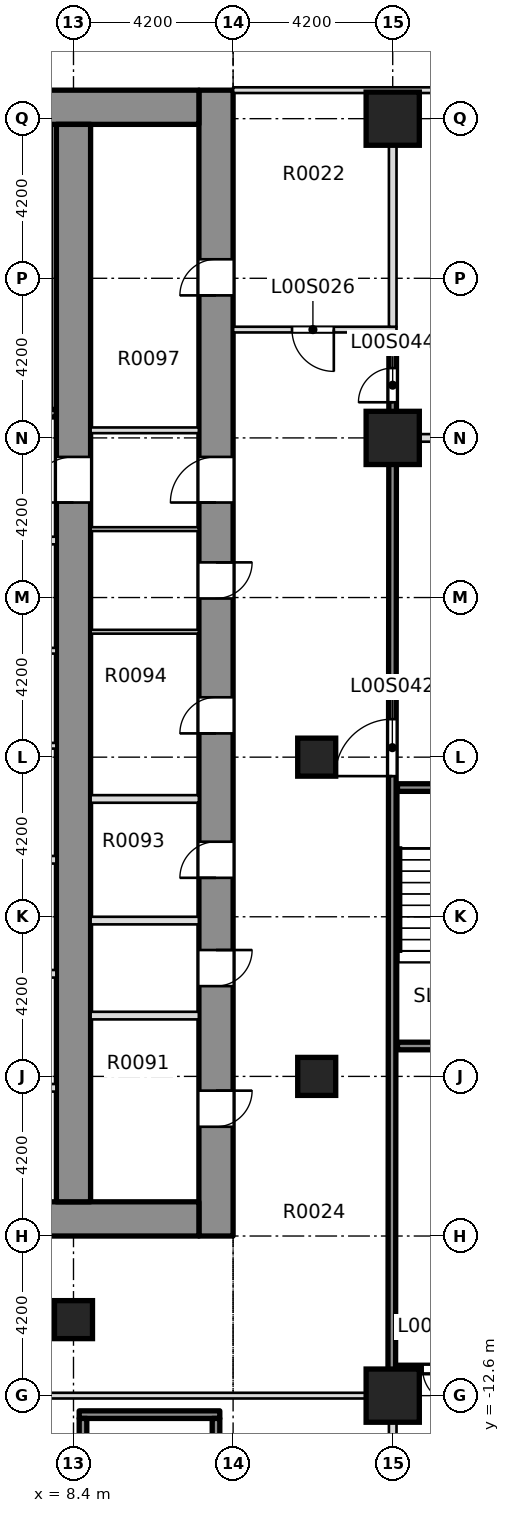
"""IFC4 building model, lengths in metres.
Left out: names, types, materials, properties, quantities, classifications, styles, units other than length and angle.
Written with IfcOpenShell. Run it as: python <this file> out.ifc"""

import sys

from ifc_helpers import new_model, si_unit, direction, frame, frame_2d, origin, origin_2d, place, context, subcontext, project, spatial, rectangle, extrude, element, fill, save


model = new_model("IFC4")
c1 = context("Model", 3, precision=1e-05, world=origin(), true_north=direction((0.0, 1.0)))
c2 = subcontext(c1, "Body", "Model", "MODEL_VIEW")
j1 = project(units=[si_unit("LENGTHUNIT", "METRE"), si_unit("PLANEANGLEUNIT", "RADIAN")], contexts=[c1])
p1 = place(None, origin())
s1 = spatial("IfcSite", under=j1, at=p1, CompositionType="ELEMENT")
p2 = place(p1, origin())
s2 = spatial("IfcBuilding", under=s1, at=p2, CompositionType="ELEMENT")
p3 = place(p2, origin())
s3 = spatial("IfcBuildingStorey", under=s2, at=p3, CompositionType="ELEMENT", Elevation=0.0)
p4 = place(p3, frame((12.15, -8.4, -0.45), z_axis=(0.0, 0.0, 1.0), x_axis=(0.0, 1.0, 0.0)))
e1 = element("IfcWall", 1, at=p4, inside=s3, PredefinedType="SHEAR", context=c2, shape_type="SweptSolid", body=[
    extrude(rectangle(XDim=30.15, YDim=0.9, at=frame_2d((15.075, 0.0))), origin(), (0.0, 0.0, 1.0), 7.55),
])
p5 = place(p4, frame((2.875, 0.0, 0.45)))
e2 = element("IfcOpeningElement", 2, at=p5, cuts=e1, PredefinedType="OPENING", context=c2, shape_type="SweptSolid", body=[
    extrude(rectangle(XDim=0.95, YDim=2.1, at=frame_2d((0.475, 1.05))), frame((0.0, 0.46, 0.0), z_axis=(0.0, -1.0, 0.0), x_axis=(1.0, 0.0, 0.0)), (0.0, 0.0, 1.0), 0.92),
])
p6 = place(p4, frame((6.575, 0.0, 0.45)))
e3 = element("IfcOpeningElement", 3, at=p6, cuts=e1, PredefinedType="OPENING", context=c2, shape_type="SweptSolid", body=[
    extrude(rectangle(XDim=0.95, YDim=2.1, at=frame_2d((0.475, 1.05))), frame((0.0, 0.46, 0.0), z_axis=(0.0, -1.0, 0.0), x_axis=(1.0, 0.0, 0.0)), (0.0, 0.0, 1.0), 0.92),
])
p7 = place(p4, frame((9.425, 0.0, 0.45)))
e4 = element("IfcOpeningElement", 4, at=p7, cuts=e1, PredefinedType="OPENING", context=c2, shape_type="SweptSolid", body=[
    extrude(rectangle(XDim=0.95, YDim=2.1, at=frame_2d((0.475, 1.05))), frame((0.0, 0.46, 0.0), z_axis=(0.0, -1.0, 0.0), x_axis=(1.0, 0.0, 0.0)), (0.0, 0.0, 1.0), 0.92),
])
p8 = place(p4, frame((13.225, 0.0, 0.45)))
e5 = element("IfcOpeningElement", 5, at=p8, cuts=e1, PredefinedType="OPENING", context=c2, shape_type="SweptSolid", body=[
    extrude(rectangle(XDim=0.95, YDim=2.1, at=frame_2d((0.475, 1.05))), frame((0.0, 0.46, 0.0), z_axis=(0.0, -1.0, 0.0), x_axis=(1.0, 0.0, 0.0)), (0.0, 0.0, 1.0), 0.92),
])
p9 = place(p4, frame((16.775, 0.0, 0.45)))
e6 = element("IfcOpeningElement", 6, at=p9, cuts=e1, PredefinedType="OPENING", context=c2, shape_type="SweptSolid", body=[
    extrude(rectangle(XDim=0.95, YDim=2.1, at=frame_2d((0.475, 1.05))), frame((0.0, 0.46, 0.0), z_axis=(0.0, -1.0, 0.0), x_axis=(1.0, 0.0, 0.0)), (0.0, 0.0, 1.0), 0.92),
])
p10 = place(p4, frame((24.75, 0.0, 0.45)))
e7 = element("IfcOpeningElement", 7, at=p10, cuts=e1, PredefinedType="OPENING", context=c2, shape_type="SweptSolid", body=[
    extrude(rectangle(XDim=0.95, YDim=2.1, at=frame_2d((0.475, 1.05))), frame((0.0, 0.46, 0.0), z_axis=(0.0, -1.0, 0.0), x_axis=(1.0, 0.0, 0.0)), (0.0, 0.0, 1.0), 0.92),
])
p11 = place(p4, frame((19.3, 0.0, 0.45)))
e8 = element("IfcOpeningElement", 8, at=p11, cuts=e1, PredefinedType="OPENING", context=c2, shape_type="SweptSolid", body=[
    extrude(rectangle(XDim=1.2, YDim=2.1, at=frame_2d((0.6, 1.05))), frame((0.0, 0.46, 0.0), z_axis=(0.0, -1.0, 0.0), x_axis=(1.0, 0.0, 0.0)), (0.0, 0.0, 1.0), 0.92),
])
p12 = place(p3, frame((-11.7, -7.95, -0.45), z_axis=(0.0, 0.0, 1.0), x_axis=(1.0, 0.0, 0.0)))
e9 = element("IfcWall", 9, at=p12, inside=s3, PredefinedType="SHEAR", context=c2, shape_type="SweptSolid", body=[
    extrude(rectangle(XDim=23.4, YDim=0.9, at=frame_2d((11.7, 0.0))), origin(), (0.0, 0.0, 1.0), 7.55),
])
p13 = place(p12, frame((6.95, 0.0, 0.45)))
e10 = element("IfcOpeningElement", 10, at=p13, cuts=e9, PredefinedType="OPENING", context=c2, shape_type="SweptSolid", body=[
    extrude(rectangle(XDim=1.8, YDim=2.1, at=frame_2d((0.9, 1.05))), frame((0.0, 0.46, 0.0), z_axis=(0.0, -1.0, 0.0), x_axis=(1.0, 0.0, 0.0)), (0.0, 0.0, 1.0), 0.92),
])
p14 = place(p12, frame((14.65, 0.0, 0.45)))
e11 = element("IfcOpeningElement", 11, at=p14, cuts=e9, PredefinedType="OPENING", context=c2, shape_type="SweptSolid", body=[
    extrude(rectangle(XDim=1.8, YDim=2.1, at=frame_2d((0.9, 1.05))), frame((0.0, 0.46, 0.0), z_axis=(0.0, -1.0, 0.0), x_axis=(1.0, 0.0, 0.0)), (0.0, 0.0, 1.0), 0.92),
])
p15 = place(p3, frame((-11.7, 21.3, -0.45), z_axis=(0.0, 0.0, 1.0), x_axis=(1.0, 0.0, 0.0)))
e12 = element("IfcWall", 12, at=p15, inside=s3, PredefinedType="SOLIDWALL", context=c2, shape_type="SweptSolid", body=[
    extrude(rectangle(XDim=23.4, YDim=0.9, at=frame_2d((11.7, 0.0))), origin(), (0.0, 0.0, 1.0), 7.55),
])
p16 = place(p15, frame((11.1, 0.0, 0.45)))
e13 = element("IfcOpeningElement", 13, at=p16, cuts=e12, PredefinedType="OPENING", context=c2, shape_type="SweptSolid", body=[
    extrude(rectangle(XDim=1.2, YDim=2.1, at=frame_2d((0.6, 1.05))), frame((0.0, 0.46, 0.0), z_axis=(0.0, -1.0, 0.0), x_axis=(1.0, 0.0, 0.0)), (0.0, 0.0, 1.0), 0.92),
])
p17 = place(p3, frame((8.4, -7.5, -0.45), z_axis=(0.0, 0.0, 1.0), x_axis=(0.0, 1.0, 0.0)))
e14 = element("IfcWall", 14, at=p17, inside=s3, PredefinedType="SHEAR", context=c2, shape_type="SweptSolid", body=[
    extrude(rectangle(XDim=28.35, YDim=0.9, at=frame_2d((14.175, 0.0))), origin(), (0.0, 0.0, 1.0), 7.55),
])
p18 = place(p17, frame((18.4, 0.0, 0.45)))
e15 = element("IfcOpeningElement", 15, at=p18, cuts=e14, PredefinedType="OPENING", context=c2, shape_type="SweptSolid", body=[
    extrude(rectangle(XDim=1.2, YDim=2.1, at=frame_2d((0.6, 1.05))), frame((0.0, 0.46, 0.0), z_axis=(0.0, -1.0, 0.0), x_axis=(1.0, 0.0, 0.0)), (0.0, 0.0, 1.0), 0.92),
])
for number, where, z_axis, x_axis in (
    (16, (16.8, -12.6, -0.45), (0.0, 0.0, 1.0), (1.0, 0.0, 0.0)),
    (17, (16.8, 12.6, -0.45), (0.0, 0.0, 1.0), (1.0, 0.0, 0.0)),
    (18, (16.8, 21.0, -0.45), (0.0, 0.0, 1.0), (1.0, 0.0, 0.0)),
):
    element("IfcColumn", number, at=place(p3, frame(where, z_axis=z_axis, x_axis=x_axis)), inside=s3, PredefinedType="COLUMN", context=c2, shape_type="SweptSolid", body=[
        extrude(rectangle(XDim=1.4, YDim=1.4, at=origin_2d()), origin(), (0.0, 0.0, 1.0), 7.55),
    ])
for number, where, z_axis, x_axis in (
    (19, (8.4, -10.6, -0.45), (0.0, 0.0, 1.0), (1.0, 0.0, 0.0)),
    (20, (14.8, -4.2, -0.45), (0.0, 0.0, 1.0), (1.0, 0.0, 0.0)),
    (21, (14.8, 4.2, -0.45), (0.0, 0.0, 1.0), (1.0, 0.0, 0.0)),
):
    element("IfcColumn", number, at=place(p3, frame(where, z_axis=z_axis, x_axis=x_axis)), inside=s3, PredefinedType="COLUMN", context=c2, shape_type="SweptSolid", body=[
        extrude(rectangle(XDim=1.0, YDim=1.0, at=origin_2d()), origin(), (0.0, 0.0, 1.0), 7.55),
    ])
p19 = place(p3, frame((7.275, -12.6, 0.0), z_axis=(0.0, 0.0, 1.0), x_axis=(1.0, 0.0, 0.0)))
e22 = element("IfcWall", 22, at=p19, inside=s3, PredefinedType="PARTITIONING", context=c2, shape_type="SweptSolid", body=[
    extrude(rectangle(XDim=9.625, YDim=0.15, at=frame_2d((4.812, 0.0))), origin(), (0.0, 0.0, 1.0), 7.1),
])
p20 = place(p3, frame((16.875, -11.9, 0.0), z_axis=(0.0, 0.0, 1.0), x_axis=(1.0, 0.0, 0.0)))
e23 = element("IfcWall", 23, at=p20, inside=s3, PredefinedType="SOLIDWALL", context=c2, shape_type="SweptSolid", body=[
    extrude(rectangle(XDim=8.425, YDim=0.2, at=frame_2d((4.212, 0.0))), origin(), (0.0, 0.0, 1.0), 7.1),
])
p21 = place(p20, frame((0.712, 0.0, 0.0)))
e24 = element("IfcOpeningElement", 24, at=p21, cuts=e23, PredefinedType="OPENING", context=c2, shape_type="SweptSolid", body=[
    extrude(rectangle(XDim=0.9, YDim=2.1, at=frame_2d((0.45, 1.05))), frame((0.0, 0.11, 0.0), z_axis=(0.0, -1.0, 0.0), x_axis=(1.0, 0.0, 0.0)), (0.0, 0.0, 1.0), 0.22),
])
p22 = place(p3, frame((16.875, 12.6, 0.0), z_axis=(0.0, 0.0, 1.0), x_axis=(1.0, 0.0, 0.0)))
e25 = element("IfcWall", 25, at=p22, inside=s3, PredefinedType="PARTITIONING", context=c2, shape_type="SweptSolid", body=[
    extrude(rectangle(XDim=34.075, YDim=0.2, at=frame_2d((17.038, 0.0))), origin(), (0.0, 0.0, 1.0), 7.1),
])
p23 = place(p22, frame((17.525, 0.0, 0.0)))
e26 = element("IfcOpeningElement", 26, at=p23, cuts=e25, PredefinedType="OPENING", context=c2, shape_type="SweptSolid", body=[
    extrude(rectangle(XDim=0.9, YDim=2.1, at=frame_2d((0.45, 1.05))), frame((0.0, 0.11, 0.0), z_axis=(0.0, -1.0, 0.0), x_axis=(1.0, 0.0, 0.0)), (0.0, 0.0, 1.0), 0.22),
])
p24 = place(p3, frame((12.601, 15.45, 0.0), z_axis=(0.0, 0.0, 1.0), x_axis=(1.0, 0.0, 0.0)))
e27 = element("IfcWall", 27, at=p24, inside=s3, PredefinedType="PARTITIONING", context=c2, shape_type="SweptSolid", body=[
    extrude(rectangle(XDim=4.299, YDim=0.15, at=frame_2d((2.149, 0.0))), origin(), (0.0, 0.0, 1.0), 7.1),
])
p25 = place(p24, frame((1.549, 0.0, 0.0)))
e28 = element("IfcOpeningElement", 28, at=p25, cuts=e27, PredefinedType="OPENING", context=c2, shape_type="SweptSolid", body=[
    extrude(rectangle(XDim=1.1, YDim=2.1, at=frame_2d((0.55, 1.05))), frame((0.0, 0.085, 0.0), z_axis=(0.0, -1.0, 0.0), x_axis=(1.0, 0.0, 0.0)), (0.0, 0.0, 1.0), 0.17),
])
p26 = place(p3, frame((12.601, 21.75, 0.0), z_axis=(0.0, 0.0, 1.0), x_axis=(1.0, 0.0, 0.0)))
e29 = element("IfcWall", 29, at=p26, inside=s3, PredefinedType="PARTITIONING", context=c2, shape_type="SweptSolid", body=[
    extrude(rectangle(XDim=21.074, YDim=0.15, at=frame_2d((10.537, 0.0))), origin(), (0.0, 0.0, 1.0), 7.1),
])
p27 = place(p3, frame((16.8, -18.125, 0.0), z_axis=(0.0, 0.0, 1.0), x_axis=(0.0, 1.0, 0.0)))
e30 = element("IfcWall", 30, at=p27, inside=s3, PredefinedType="PARTITIONING", context=c2, shape_type="SweptSolid", body=[
    extrude(rectangle(XDim=5.45, YDim=0.2, at=frame_2d((2.725, 0.0))), origin(), (0.0, 0.0, 1.0), 7.1),
])
p28 = place(p3, frame((16.775, -12.525, 0.0), z_axis=(0.0, 0.0, 1.0), x_axis=(0.000893357267, 0.999999600956, 0.0)))
e31 = element("IfcWall", 31, at=p28, inside=s3, PredefinedType="SOLIDWALL", context=c2, shape_type="SweptSolid", body=[
    extrude(rectangle(XDim=27.875, YDim=0.2, at=frame_2d((13.938, 0.0))), origin(), (0.0, 0.0, 1.0), 7.1),
])
p29 = place(p28, frame((16.225, 0.0, 0.0)))
e32 = element("IfcOpeningElement", 32, at=p29, cuts=e31, PredefinedType="OPENING", context=c2, shape_type="SweptSolid", body=[
    extrude(rectangle(XDim=1.5, YDim=2.1, at=frame_2d((0.75, 1.05))), frame((0.0, 0.11, 0.0), z_axis=(0.0, -1.0, 0.0), x_axis=(1.0, 0.0, 0.0)), (0.0, 0.0, 1.0), 0.22),
])
p30 = place(p28, frame((26.062, 0.0, 0.0)))
e33 = element("IfcOpeningElement", 33, at=p30, cuts=e31, PredefinedType="OPENING", context=c2, shape_type="SweptSolid", body=[
    extrude(rectangle(XDim=0.9, YDim=2.1, at=frame_2d((0.45, 1.05))), frame((0.0, 0.11, 0.0), z_axis=(0.0, -1.0, 0.0), x_axis=(1.0, 0.0, 0.0)), (0.0, 0.0, 1.0), 0.22),
])
p31 = place(p3, frame((16.8, 15.525, 0.0), z_axis=(0.0, 0.0, 1.0), x_axis=(0.0, 1.0, 0.0)))
e34 = element("IfcWall", 34, at=p31, inside=s3, PredefinedType="PARTITIONING", context=c2, shape_type="SweptSolid", body=[
    extrude(rectangle(XDim=6.15, YDim=0.2, at=frame_2d((3.075, 0.0))), origin(), (0.0, 0.0, 1.0), 7.1),
])
for number, where, z_axis, x_axis in (
    (35, (5.575, -4.5, 0.0), (0.0, 0.0, 1.0), (1.0, 0.0, 0.0)),
    (36, (5.575, -1.5, 0.0), (0.0, 0.0, 1.0), (1.0, 0.0, 0.0)),
    (37, (5.575, 1.5, 0.0), (0.0, 0.0, 1.0), (1.0, 0.0, 0.0)),
):
    element("IfcWall", number, at=place(p3, frame(where, z_axis=z_axis, x_axis=x_axis)), inside=s3, PredefinedType="PARTITIONING", context=c2, shape_type="SweptSolid", body=[
        extrude(rectangle(XDim=2.374, YDim=0.2, at=frame_2d((1.187, 0.0))), origin(), (0.0, 0.0, 1.0), 7.1),
    ])
p32 = place(p3, frame((5.425, 4.5, 0.0), z_axis=(0.0, 0.0, 1.0), x_axis=(1.0, 0.0, 0.0)))
e38 = element("IfcWall", 38, at=p32, inside=s3, PredefinedType="PARTITIONING", context=c2, shape_type="SweptSolid", body=[
    extrude(rectangle(XDim=2.524, YDim=0.15, at=frame_2d((1.262, 0.0))), origin(), (0.0, 0.0, 1.0), 7.1),
])
p33 = place(p3, frame((-7.949, 7.0, 0.0), z_axis=(0.0, 0.0, 1.0), x_axis=(1.0, 0.0, 0.0)))
e39 = element("IfcWall", 39, at=p33, inside=s3, PredefinedType="PARTITIONING", context=c2, shape_type="SweptSolid", body=[
    extrude(rectangle(XDim=15.898, YDim=0.15, at=frame_2d((7.949, 0.0))), origin(), (0.0, 0.0, 1.0), 7.1),
])
p34 = place(p33, frame((7.249, 0.0, 0.0)))
e40 = element("IfcOpeningElement", 40, at=p34, cuts=e39, PredefinedType="OPENING", context=c2, shape_type="SweptSolid", body=[
    extrude(rectangle(XDim=1.4, YDim=2.1, at=frame_2d((0.7, 1.05))), frame((0.0, 0.085, 0.0), z_axis=(0.0, -1.0, 0.0), x_axis=(1.0, 0.0, 0.0)), (0.0, 0.0, 1.0), 0.17),
])
p35 = place(p3, frame((3.6, 9.9, 0.0), z_axis=(0.0, 0.0, 1.0), x_axis=(1.0, 0.0, 0.0)))
e41 = element("IfcWall", 41, at=p35, inside=s3, PredefinedType="PARTITIONING", context=c2, shape_type="SweptSolid", body=[
    extrude(rectangle(XDim=4.349, YDim=0.2, at=frame_2d((2.174, 0.0))), origin(), (0.0, 0.0, 1.0), 7.1),
])
p36 = place(p35, frame((2.25, 0.0, 0.0)))
e42 = element("IfcOpeningElement", 42, at=p36, cuts=e41, PredefinedType="OPENING", context=c2, shape_type="SweptSolid", body=[
    extrude(rectangle(XDim=1.1, YDim=2.1, at=frame_2d((0.55, 1.05))), frame((0.0, 0.11, 0.0), z_axis=(0.0, -1.0, 0.0), x_axis=(1.0, 0.0, 0.0)), (0.0, 0.0, 1.0), 0.22),
])
p37 = place(p3, frame((3.425, 13.25, 0.0), z_axis=(0.0, 0.0, 1.0), x_axis=(1.0, 0.0, 0.0)))
e43 = element("IfcWall", 43, at=p37, inside=s3, PredefinedType="SOLIDWALL", context=c2, shape_type="SweptSolid", body=[
    extrude(rectangle(XDim=4.524, YDim=0.2, at=frame_2d((2.262, 0.0))), origin(), (0.0, 0.0, 1.0), 7.1),
])
p38 = place(p37, frame((1.825, 0.0, 0.0)))
e44 = element("IfcOpeningElement", 44, at=p38, cuts=e43, PredefinedType="OPENING", context=c2, shape_type="SweptSolid", body=[
    extrude(rectangle(XDim=1.2, YDim=2.1, at=frame_2d((0.6, 1.05))), frame((0.0, 0.11, 0.0), z_axis=(0.0, -1.0, 0.0), x_axis=(1.0, 0.0, 0.0)), (0.0, 0.0, 1.0), 0.22),
])
for number, where, z_axis, x_axis in (
    (45, (8.851, -2.6, 0.0), (0.0, 0.0, 1.0), (1.0, 0.0, 0.0)),
    (46, (8.851, -0.1, 0.0), (0.0, 0.0, 1.0), (1.0, 0.0, 0.0)),
    (47, (8.851, 3.1, 0.0), (0.0, 0.0, 1.0), (1.0, 0.0, 0.0)),
):
    element("IfcWall", number, at=place(p3, frame(where, z_axis=z_axis, x_axis=x_axis)), inside=s3, PredefinedType="PARTITIONING", context=c2, shape_type="SweptSolid", body=[
        extrude(rectangle(XDim=2.848, YDim=0.2, at=frame_2d((1.424, 0.0))), origin(), (0.0, 0.0, 1.0), 7.1),
    ])
for number, where, z_axis, x_axis in (
    (48, (8.851, 7.5, 0.0), (0.0, 0.0, 1.0), (1.0, 0.0, 0.0)),
    (49, (8.851, 10.2, 0.0), (0.0, 0.0, 1.0), (1.0, 0.0, 0.0)),
):
    element("IfcWall", number, at=place(p3, frame(where, z_axis=z_axis, x_axis=x_axis)), inside=s3, PredefinedType="PARTITIONING", context=c2, shape_type="SweptSolid", body=[
        extrude(rectangle(XDim=2.848, YDim=0.1, at=frame_2d((1.424, 0.0))), origin(), (0.0, 0.0, 1.0), 7.1),
    ])
p39 = place(p3, frame((8.851, 12.8, 0.0), z_axis=(0.0, 0.0, 1.0), x_axis=(1.0, 0.0, 0.0)))
e50 = element("IfcWall", 50, at=p39, inside=s3, PredefinedType="PARTITIONING", context=c2, shape_type="SweptSolid", body=[
    extrude(rectangle(XDim=2.848, YDim=0.15, at=frame_2d((1.424, 0.0))), origin(), (0.0, 0.0, 1.0), 7.1),
])
p40 = place(p3, frame((8.55, -13.1, 0.0), z_axis=(0.0, 0.0, 1.0), x_axis=(1.0, 0.0, 0.0)))
e51 = element("IfcWall", 51, at=p40, inside=s3, PredefinedType="SOLIDWALL", context=c2, shape_type="SweptSolid", body=[
    extrude(rectangle(XDim=3.7, YDim=0.2, at=frame_2d((1.85, 0.0))), origin(), (0.0, 0.0, 1.0), 7.1),
])
p41 = place(p3, frame((8.65, -20.3, 0.0), z_axis=(0.0, 0.0, 1.0), x_axis=(0.0, 1.0, 0.0)))
e52 = element("IfcWall", 52, at=p41, inside=s3, PredefinedType="SOLIDWALL", context=c2, shape_type="SweptSolid", body=[
    extrude(rectangle(XDim=7.1, YDim=0.2, at=frame_2d((3.55, 0.0))), origin(), (0.0, 0.0, 1.0), 7.1),
])
p42 = place(p3, frame((12.15, -19.8, 0.0), z_axis=(0.0, 0.0, 1.0), x_axis=(0.0, 1.0, 0.0)))
e53 = element("IfcWall", 53, at=p42, inside=s3, PredefinedType="SOLIDWALL", context=c2, shape_type="SweptSolid", body=[
    extrude(rectangle(XDim=6.6, YDim=0.2, at=frame_2d((3.3, 0.0))), origin(), (0.0, 0.0, 1.0), 7.1),
])
for number, where, z_axis, x_axis in (
    (54, (16.925, -3.4, 0.0), (0.0, 0.0, 1.0), (1.0, 0.0, 0.0)),
    (55, (16.925, 3.4, 0.0), (0.0, 0.0, 1.0), (1.0, 0.0, 0.0)),
):
    element("IfcWall", number, at=place(p3, frame(where, z_axis=z_axis, x_axis=x_axis)), inside=s3, PredefinedType="SOLIDWALL", context=c2, shape_type="SweptSolid", body=[
        extrude(rectangle(XDim=3.525, YDim=0.2, at=frame_2d((1.762, 0.0))), origin(), (0.0, 0.0, 1.0), 7.1),
    ])
p43 = place(p25, origin())
e56 = element("IfcDoor", 56, at=p43, inside=s3, OperationType="SINGLE_SWING_LEFT", PredefinedType="DOOR", context=c2, shape_type="SweptSolid", body=[
    extrude(rectangle(XDim=1.1, YDim=2.1, at=frame_2d((0.55, 1.05))), frame((0.0, 0.025, 0.0), z_axis=(0.0, -1.0, 0.0), x_axis=(1.0, 0.0, 0.0)), (0.0, 0.0, 1.0), 0.05),
])
fill(e28, e56)
p44 = place(p29, origin())
e57 = element("IfcDoor", 57, at=p44, inside=s3, OperationType="DOUBLE_DOOR_SINGLE_SWING", PredefinedType="DOOR", context=c2, shape_type="SweptSolid", body=[
    extrude(rectangle(XDim=1.5, YDim=2.1, at=frame_2d((0.75, 1.05))), frame((0.0, 0.025, 0.0), z_axis=(0.0, -1.0, 0.0), x_axis=(1.0, 0.0, 0.0)), (0.0, 0.0, 1.0), 0.05),
])
fill(e32, e57)
p45 = place(p21, origin())
e58 = element("IfcDoor", 58, at=p45, inside=s3, OperationType="SINGLE_SWING_LEFT", PredefinedType="DOOR", context=c2, shape_type="SweptSolid", body=[
    extrude(rectangle(XDim=0.9, YDim=2.1, at=frame_2d((0.45, 1.05))), frame((0.0, 0.025, 0.0), z_axis=(0.0, -1.0, 0.0), x_axis=(1.0, 0.0, 0.0)), (0.0, 0.0, 1.0), 0.05),
])
fill(e24, e58)
p46 = place(p30, origin())
e59 = element("IfcDoor", 59, at=p46, inside=s3, OperationType="SINGLE_SWING_LEFT", PredefinedType="DOOR", context=c2, shape_type="SweptSolid", body=[
    extrude(rectangle(XDim=0.9, YDim=2.1, at=frame_2d((0.45, 1.05))), frame((0.0, 0.025, 0.0), z_axis=(0.0, -1.0, 0.0), x_axis=(1.0, 0.0, 0.0)), (0.0, 0.0, 1.0), 0.05),
])
fill(e33, e59)
p47 = place(p5, origin())
e60 = element("IfcDoor", 60, at=p47, inside=s3, OperationType="SINGLE_SWING_LEFT", PredefinedType="DOOR", context=c2, shape_type="SweptSolid", body=[
    extrude(rectangle(XDim=0.95, YDim=2.1, at=frame_2d((0.475, 1.05))), frame((0.0, 0.025, 0.0), z_axis=(0.0, -1.0, 0.0), x_axis=(1.0, 0.0, 0.0)), (0.0, 0.0, 1.0), 0.05),
])
fill(e2, e60)
p48 = place(p6, origin())
e61 = element("IfcDoor", 61, at=p48, inside=s3, OperationType="SINGLE_SWING_LEFT", PredefinedType="DOOR", context=c2, shape_type="SweptSolid", body=[
    extrude(rectangle(XDim=0.95, YDim=2.1, at=frame_2d((0.475, 1.05))), frame((0.0, 0.025, 0.0), z_axis=(0.0, -1.0, 0.0), x_axis=(1.0, 0.0, 0.0)), (0.0, 0.0, 1.0), 0.05),
])
fill(e3, e61)
p49 = place(p7, origin())
e62 = element("IfcDoor", 62, at=p49, inside=s3, OperationType="SINGLE_SWING_LEFT", PredefinedType="DOOR", context=c2, shape_type="SweptSolid", body=[
    extrude(rectangle(XDim=0.95, YDim=2.1, at=frame_2d((0.475, 1.05))), frame((0.0, 0.025, 0.0), z_axis=(0.0, -1.0, 0.0), x_axis=(1.0, 0.0, 0.0)), (0.0, 0.0, 1.0), 0.05),
])
fill(e4, e62)
p50 = place(p8, origin())
e63 = element("IfcDoor", 63, at=p50, inside=s3, OperationType="SINGLE_SWING_LEFT", PredefinedType="DOOR", context=c2, shape_type="SweptSolid", body=[
    extrude(rectangle(XDim=0.95, YDim=2.1, at=frame_2d((0.475, 1.05))), frame((0.0, 0.025, 0.0), z_axis=(0.0, -1.0, 0.0), x_axis=(1.0, 0.0, 0.0)), (0.0, 0.0, 1.0), 0.05),
])
fill(e5, e63)
p51 = place(p9, origin())
e64 = element("IfcDoor", 64, at=p51, inside=s3, OperationType="SINGLE_SWING_LEFT", PredefinedType="DOOR", context=c2, shape_type="SweptSolid", body=[
    extrude(rectangle(XDim=0.95, YDim=2.1, at=frame_2d((0.475, 1.05))), frame((0.0, 0.025, 0.0), z_axis=(0.0, -1.0, 0.0), x_axis=(1.0, 0.0, 0.0)), (0.0, 0.0, 1.0), 0.05),
])
fill(e6, e64)
p52 = place(p10, origin())
e65 = element("IfcDoor", 65, at=p52, inside=s3, OperationType="SINGLE_SWING_LEFT", PredefinedType="DOOR", context=c2, shape_type="SweptSolid", body=[
    extrude(rectangle(XDim=0.95, YDim=2.1, at=frame_2d((0.475, 1.05))), frame((0.0, 0.025, 0.0), z_axis=(0.0, -1.0, 0.0), x_axis=(1.0, 0.0, 0.0)), (0.0, 0.0, 1.0), 0.05),
])
fill(e7, e65)
p53 = place(p11, origin())
e66 = element("IfcDoor", 66, at=p53, inside=s3, OperationType="SINGLE_SWING_LEFT", PredefinedType="DOOR", context=c2, shape_type="SweptSolid", body=[
    extrude(rectangle(XDim=1.2, YDim=2.1, at=frame_2d((0.6, 1.05))), frame((0.0, 0.025, 0.0), z_axis=(0.0, -1.0, 0.0), x_axis=(1.0, 0.0, 0.0)), (0.0, 0.0, 1.0), 0.05),
])
fill(e8, e66)
p54 = place(p18, origin())
e67 = element("IfcDoor", 67, at=p54, inside=s3, OperationType="SINGLE_SWING_LEFT", PredefinedType="DOOR", context=c2, shape_type="SweptSolid", body=[
    extrude(rectangle(XDim=1.2, YDim=2.1, at=frame_2d((0.6, 1.05))), frame((0.0, 0.025, 0.0), z_axis=(0.0, -1.0, 0.0), x_axis=(1.0, 0.0, 0.0)), (0.0, 0.0, 1.0), 0.05),
])
fill(e15, e67)
save(model, sys.argv[1])
